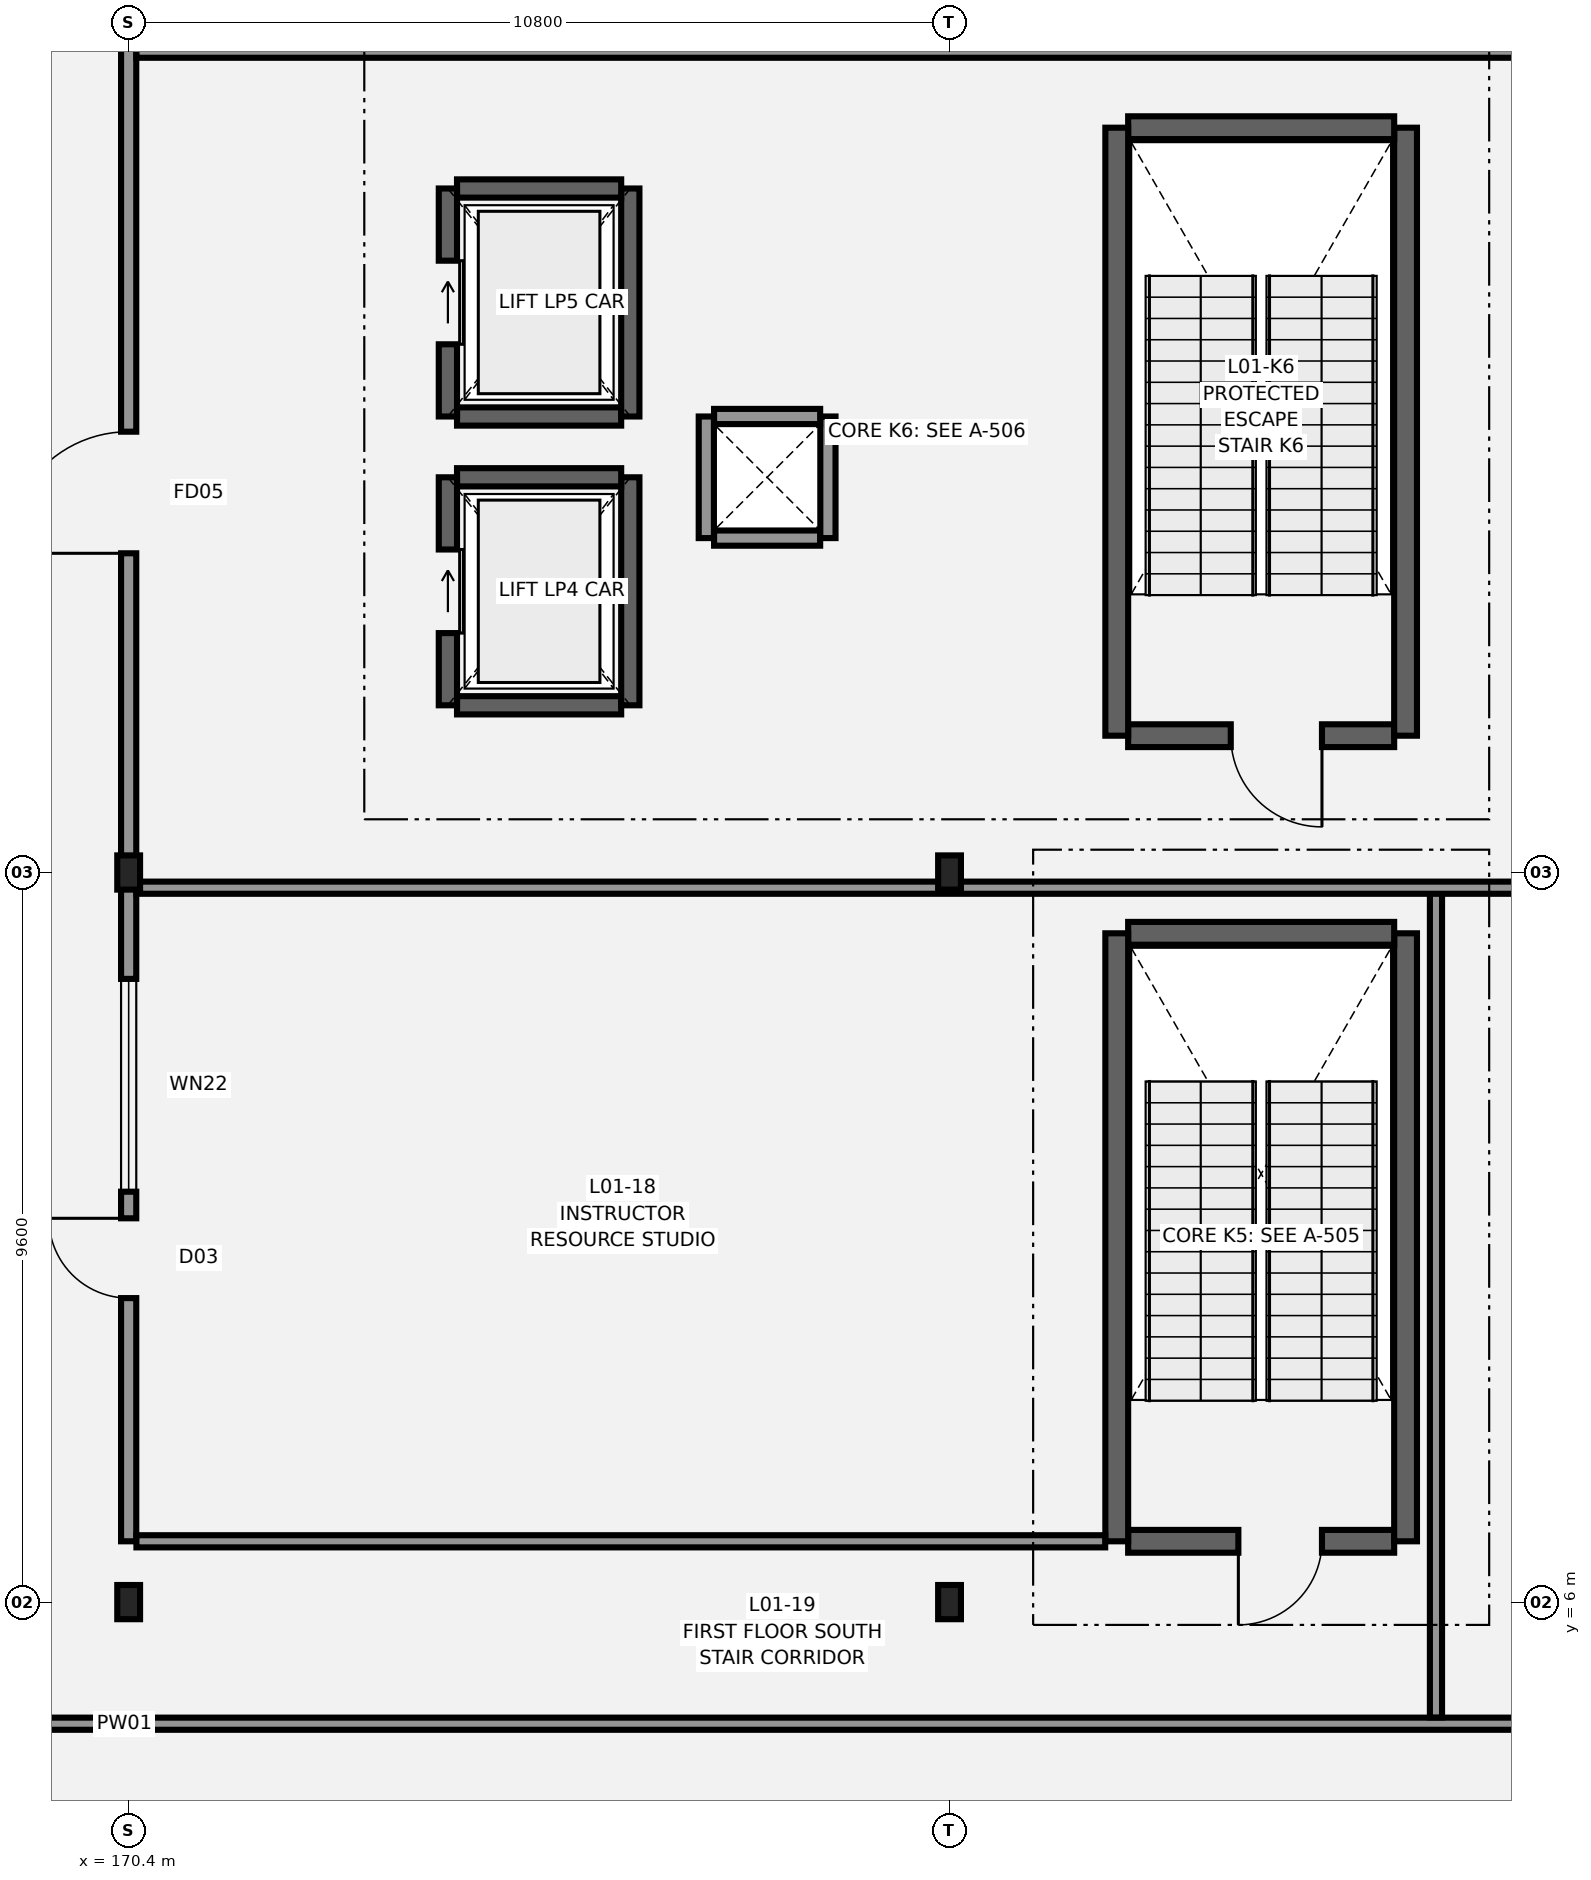
"""IFC4 building model, lengths in metres.
Left out: names, types, materials, properties, quantities, classifications, styles, units other than length and angle.
Written with IfcOpenShell. Run it as: python <this file> out.ifc"""

import sys

from ifc_helpers import new_model, si_unit, direction, frame, frame_2d, origin, origin_2d, place, context, subcontext, project, spatial, rectangle, i_section, extrude, element, fill, save


model = new_model("IFC4")
c1 = context("Model", 3, precision=1e-05, world=origin(), true_north=direction((0.0, 1.0)))
c2 = subcontext(c1, "Body", "Model", "MODEL_VIEW")
j1 = project(units=[si_unit("LENGTHUNIT", "METRE"), si_unit("PLANEANGLEUNIT", "RADIAN")], contexts=[c1])
p1 = place(None, origin())
s1 = spatial("IfcSite", under=j1, at=p1, CompositionType="ELEMENT")
p2 = place(p1, origin())
s2 = spatial("IfcBuilding", under=s1, at=p2, CompositionType="ELEMENT")
p3 = place(p2, frame((0.0, 0.0, 5.4)))
s3 = spatial("IfcBuildingStorey", under=s2, at=p3, CompositionType="ELEMENT", Elevation=5.4)
for number, where, z_axis, x_axis in (
    (1, (170.4, 6.0, 0.0), (0.0, 0.0, 1.0), (1.0, 0.0, 0.0)),
    (2, (170.4, 15.6, 0.0), (0.0, 0.0, 1.0), (1.0, 0.0, 0.0)),
    (3, (181.2, 6.0, 0.0), (0.0, 0.0, 1.0), (1.0, 0.0, 0.0)),
    (4, (181.2, 15.6, 0.0), (0.0, 0.0, 1.0), (1.0, 0.0, 0.0)),
):
    element("IfcColumn", number, at=place(p3, frame(where, z_axis=z_axis, x_axis=x_axis)), inside=s3, PredefinedType="COLUMN", context=c2, shape_type="SweptSolid", body=[
        extrude(i_section(OverallWidth=0.3, OverallDepth=0.45, WebThickness=0.014, FlangeThickness=0.026, FilletRadius=0.027, at=origin_2d()), origin(), (0.0, 0.0, 1.0), 4.8),
    ])
p4 = place(p3, frame((187.05, 6.8, 0.0), z_axis=(0.0, 0.0, 1.0), x_axis=(-1.0, 0.0, 0.0)))
e5 = element("IfcWall", 5, at=p4, inside=s3, PredefinedType="SHEAR", context=c2, shape_type="SweptSolid", body=[
    extrude(rectangle(XDim=3.5, YDim=0.3, at=frame_2d((1.75, 0.0))), origin(), (0.0, 0.0, 1.0), 4.49),
])
p5 = place(p4, frame((0.95, 0.0, 0.0)))
e6 = element("IfcOpeningElement", 6, at=p5, cuts=e5, PredefinedType="OPENING", context=c2, shape_type="SweptSolid", body=[
    extrude(rectangle(XDim=1.1, YDim=2.15, at=frame_2d((0.55, 1.075))), frame((0.0, 0.16, 0.0), z_axis=(0.0, -1.0, 0.0), x_axis=(1.0, 0.0, 0.0)), (0.0, 0.0, 1.0), 0.32),
])
p6 = place(p3, frame((187.2, 6.8, 0.0), z_axis=(0.0, 0.0, 1.0), x_axis=(0.0, 1.0, 0.0)))
e7 = element("IfcWall", 7, at=p6, inside=s3, PredefinedType="SHEAR", context=c2, shape_type="SweptSolid", body=[
    extrude(rectangle(XDim=8.0, YDim=0.3, at=frame_2d((4.0, 0.0))), origin(), (0.0, 0.0, 1.0), 4.49),
])
p7 = place(p3, frame((187.05, 14.8, 0.0), z_axis=(0.0, 0.0, 1.0), x_axis=(-1.0, 0.0, 0.0)))
e8 = element("IfcWall", 8, at=p7, inside=s3, PredefinedType="SHEAR", context=c2, shape_type="SweptSolid", body=[
    extrude(rectangle(XDim=3.5, YDim=0.3, at=frame_2d((1.75, 0.0))), origin(), (0.0, 0.0, 1.0), 4.49),
])
p8 = place(p3, frame((183.4, 14.8, 0.0), z_axis=(0.0, 0.0, 1.0), x_axis=(0.0, -1.0, 0.0)))
e9 = element("IfcWall", 9, at=p8, inside=s3, PredefinedType="SHEAR", context=c2, shape_type="SweptSolid", body=[
    extrude(rectangle(XDim=8.0, YDim=0.3, at=frame_2d((4.0, 0.0))), origin(), (0.0, 0.0, 1.0), 4.49),
])
p9 = place(p3, frame((187.05, 17.4, 0.0), z_axis=(0.0, 0.0, 1.0), x_axis=(-1.0, 0.0, 0.0)))
e10 = element("IfcWall", 10, at=p9, inside=s3, PredefinedType="SHEAR", context=c2, shape_type="SweptSolid", body=[
    extrude(rectangle(XDim=3.5, YDim=0.3, at=frame_2d((1.75, 0.0))), origin(), (0.0, 0.0, 1.0), 4.49),
])
p10 = place(p9, frame((0.95, 0.0, 0.0)))
e11 = element("IfcOpeningElement", 11, at=p10, cuts=e10, PredefinedType="OPENING", context=c2, shape_type="SweptSolid", body=[
    extrude(rectangle(XDim=1.2, YDim=2.2, at=frame_2d((0.6, 1.1))), frame((0.0, 0.16, 0.0), z_axis=(0.0, -1.0, 0.0), x_axis=(1.0, 0.0, 0.0)), (0.0, 0.0, 1.0), 0.32),
])
p11 = place(p3, frame((187.2, 17.4, 0.0), z_axis=(0.0, 0.0, 1.0), x_axis=(0.0, 1.0, 0.0)))
e12 = element("IfcWall", 12, at=p11, inside=s3, PredefinedType="SHEAR", context=c2, shape_type="SweptSolid", body=[
    extrude(rectangle(XDim=8.0, YDim=0.3, at=frame_2d((4.0, 0.0))), origin(), (0.0, 0.0, 1.0), 4.49),
])
p12 = place(p3, frame((187.05, 25.4, 0.0), z_axis=(0.0, 0.0, 1.0), x_axis=(-1.0, 0.0, 0.0)))
e13 = element("IfcWall", 13, at=p12, inside=s3, PredefinedType="SHEAR", context=c2, shape_type="SweptSolid", body=[
    extrude(rectangle(XDim=3.5, YDim=0.3, at=frame_2d((1.75, 0.0))), origin(), (0.0, 0.0, 1.0), 4.49),
])
p13 = place(p3, frame((183.4, 25.4, 0.0), z_axis=(0.0, 0.0, 1.0), x_axis=(0.0, -1.0, 0.0)))
e14 = element("IfcWall", 14, at=p13, inside=s3, PredefinedType="SHEAR", context=c2, shape_type="SweptSolid", body=[
    extrude(rectangle(XDim=8.0, YDim=0.3, at=frame_2d((4.0, 0.0))), origin(), (0.0, 0.0, 1.0), 4.49),
])
p14 = place(p3, frame((174.72, 17.8, 0.0), z_axis=(0.0, 0.0, 1.0), x_axis=(1.0, 0.0, 0.0)))
e15 = element("IfcWall", 15, at=p14, inside=s3, PredefinedType="SHEAR", context=c2, shape_type="SweptSolid", body=[
    extrude(rectangle(XDim=2.16, YDim=0.24, at=frame_2d((1.08, 0.0))), origin(), (0.0, 0.0, 1.0), 4.49),
])
p15 = place(p3, frame((177.0, 17.8, 0.0), z_axis=(0.0, 0.0, 1.0), x_axis=(0.0, 1.0, 0.0)))
e16 = element("IfcWall", 16, at=p15, inside=s3, PredefinedType="SHEAR", context=c2, shape_type="SweptSolid", body=[
    extrude(rectangle(XDim=3.0, YDim=0.24, at=frame_2d((1.5, 0.0))), origin(), (0.0, 0.0, 1.0), 4.49),
])
p16 = place(p3, frame((176.88, 20.8, 0.0), z_axis=(0.0, 0.0, 1.0), x_axis=(-1.0, 0.0, 0.0)))
e17 = element("IfcWall", 17, at=p16, inside=s3, PredefinedType="SHEAR", context=c2, shape_type="SweptSolid", body=[
    extrude(rectangle(XDim=2.16, YDim=0.24, at=frame_2d((1.08, 0.0))), origin(), (0.0, 0.0, 1.0), 4.49),
])
p17 = place(p3, frame((174.6, 20.8, 0.0), z_axis=(0.0, 0.0, 1.0), x_axis=(0.0, -1.0, 0.0)))
e18 = element("IfcWall", 18, at=p17, inside=s3, PredefinedType="SHEAR", context=c2, shape_type="SweptSolid", body=[
    extrude(rectangle(XDim=3.0, YDim=0.24, at=frame_2d((1.5, 0.0))), origin(), (0.0, 0.0, 1.0), 4.49),
])
p18 = place(p17, frame((0.95, 0.0, 0.0)))
e19 = element("IfcOpeningElement", 19, at=p18, cuts=e18, PredefinedType="OPENING", context=c2, shape_type="SweptSolid", body=[
    extrude(rectangle(XDim=1.1, YDim=2.1, at=frame_2d((0.55, 1.05))), frame((0.0, 0.13, 0.0), z_axis=(0.0, -1.0, 0.0), x_axis=(1.0, 0.0, 0.0)), (0.0, 0.0, 1.0), 0.26),
])
p19 = place(p3, frame((174.72, 21.6, 0.0), z_axis=(0.0, 0.0, 1.0), x_axis=(1.0, 0.0, 0.0)))
e20 = element("IfcWall", 20, at=p19, inside=s3, PredefinedType="SHEAR", context=c2, shape_type="SweptSolid", body=[
    extrude(rectangle(XDim=2.16, YDim=0.24, at=frame_2d((1.08, 0.0))), origin(), (0.0, 0.0, 1.0), 4.49),
])
p20 = place(p3, frame((177.0, 21.6, 0.0), z_axis=(0.0, 0.0, 1.0), x_axis=(0.0, 1.0, 0.0)))
e21 = element("IfcWall", 21, at=p20, inside=s3, PredefinedType="SHEAR", context=c2, shape_type="SweptSolid", body=[
    extrude(rectangle(XDim=3.0, YDim=0.24, at=frame_2d((1.5, 0.0))), origin(), (0.0, 0.0, 1.0), 4.49),
])
p21 = place(p3, frame((176.88, 24.6, 0.0), z_axis=(0.0, 0.0, 1.0), x_axis=(-1.0, 0.0, 0.0)))
e22 = element("IfcWall", 22, at=p21, inside=s3, PredefinedType="SHEAR", context=c2, shape_type="SweptSolid", body=[
    extrude(rectangle(XDim=2.16, YDim=0.24, at=frame_2d((1.08, 0.0))), origin(), (0.0, 0.0, 1.0), 4.49),
])
p22 = place(p3, frame((174.6, 24.6, 0.0), z_axis=(0.0, 0.0, 1.0), x_axis=(0.0, -1.0, 0.0)))
e23 = element("IfcWall", 23, at=p22, inside=s3, PredefinedType="SHEAR", context=c2, shape_type="SweptSolid", body=[
    extrude(rectangle(XDim=3.0, YDim=0.24, at=frame_2d((1.5, 0.0))), origin(), (0.0, 0.0, 1.0), 4.49),
])
p23 = place(p22, frame((0.95, 0.0, 0.0)))
e24 = element("IfcOpeningElement", 24, at=p23, cuts=e23, PredefinedType="OPENING", context=c2, shape_type="SweptSolid", body=[
    extrude(rectangle(XDim=1.1, YDim=2.1, at=frame_2d((0.55, 1.05))), frame((0.0, 0.13, 0.0), z_axis=(0.0, -1.0, 0.0), x_axis=(1.0, 0.0, 0.0)), (0.0, 0.0, 1.0), 0.26),
])
p24 = place(p3, frame((148.882, 4.4, 0.0), z_axis=(0.0, 0.0, 1.0), x_axis=(1.0, 0.0, 0.0)))
e25 = element("IfcWall", 25, at=p24, inside=s3, PredefinedType="PARTITIONING", context=c2, shape_type="SweptSolid", body=[
    extrude(rectangle(XDim=42.926, YDim=0.16, at=frame_2d((21.463, 0.0))), origin(), (0.0, 0.0, 1.0), 4.44),
])
p25 = place(p24, frame((19.0, 0.0, 0.0)))
e26 = element("IfcOpeningElement", 26, at=p25, cuts=e25, PredefinedType="OPENING", context=c2, shape_type="SweptSolid", body=[
    extrude(rectangle(XDim=1.15, YDim=2.15, at=frame_2d((0.575, 1.075))), frame((0.0, 0.09, 0.0), z_axis=(0.0, -1.0, 0.0), x_axis=(1.0, 0.0, 0.0)), (0.0, 0.0, 1.0), 0.18),
])
p26 = place(p3, frame((170.4, 6.8, 0.0), z_axis=(0.0, 0.0, 1.0), x_axis=(0.0, 1.0, 0.0)))
e27 = element("IfcWall", 27, at=p26, inside=s3, PredefinedType="PARTITIONING", context=c2, shape_type="SweptSolid", body=[
    extrude(rectangle(XDim=56.628, YDim=0.2, at=frame_2d((28.314, 0.0))), origin(), (0.0, 0.0, 1.0), 4.135),
])
p27 = place(p26, frame((3.2, 0.0, 0.0)))
e28 = element("IfcOpeningElement", 28, at=p27, cuts=e27, PredefinedType="OPENING", context=c2, shape_type="SweptSolid", body=[
    extrude(rectangle(XDim=1.05, YDim=2.15, at=frame_2d((0.525, 1.075))), frame((0.0, 0.11, 0.0), z_axis=(0.0, -1.0, 0.0), x_axis=(1.0, 0.0, 0.0)), (0.0, 0.0, 1.0), 0.22),
])
p28 = place(p26, frame((13.0, 0.0, 0.0)))
e29 = element("IfcOpeningElement", 29, at=p28, cuts=e27, PredefinedType="OPENING", context=c2, shape_type="SweptSolid", body=[
    extrude(rectangle(XDim=1.6, YDim=2.2, at=frame_2d((0.8, 1.1))), frame((0.0, 0.11, 0.0), z_axis=(0.0, -1.0, 0.0), x_axis=(1.0, 0.0, 0.0)), (0.0, 0.0, 1.0), 0.22),
])
p29 = place(p26, frame((26.0, 0.0, 0.0)))
e30 = element("IfcOpeningElement", 30, at=p29, cuts=e27, PredefinedType="OPENING", context=c2, shape_type="SweptSolid", body=[
    extrude(rectangle(XDim=1.3, YDim=2.15, at=frame_2d((0.65, 1.075))), frame((0.0, 0.11, 0.0), z_axis=(0.0, -1.0, 0.0), x_axis=(1.0, 0.0, 0.0)), (0.0, 0.0, 1.0), 0.22),
])
p30 = place(p26, frame((47.6, 0.0, 0.0)))
e31 = element("IfcOpeningElement", 31, at=p30, cuts=e27, PredefinedType="OPENING", context=c2, shape_type="SweptSolid", body=[
    extrude(rectangle(XDim=1.3, YDim=2.15, at=frame_2d((0.65, 1.075))), frame((0.0, 0.11, 0.0), z_axis=(0.0, -1.0, 0.0), x_axis=(1.0, 0.0, 0.0)), (0.0, 0.0, 1.0), 0.22),
])
p31 = place(p26, frame((53.2, 0.0, 0.0)))
e32 = element("IfcOpeningElement", 32, at=p31, cuts=e27, PredefinedType="OPENING", context=c2, shape_type="SweptSolid", body=[
    extrude(rectangle(XDim=1.02, YDim=2.12, at=frame_2d((0.51, 1.06))), frame((0.0, 0.11, 0.0), z_axis=(0.0, -1.0, 0.0), x_axis=(1.0, 0.0, 0.0)), (0.0, 0.0, 1.0), 0.22),
])
p32 = place(p26, frame((4.6, 0.0, 1.05)))
e33 = element("IfcOpeningElement", 33, at=p32, cuts=e27, PredefinedType="OPENING", context=c2, shape_type="SweptSolid", body=[
    extrude(rectangle(XDim=2.8, YDim=1.3, at=frame_2d((1.4, 0.65))), frame((0.0, 0.11, 0.0), z_axis=(0.0, -1.0, 0.0), x_axis=(1.0, 0.0, 0.0)), (0.0, 0.0, 1.0), 0.22),
])
p33 = place(p3, frame((170.502, 6.8, 0.0), z_axis=(0.0, 0.0, 1.0), x_axis=(1.0, 0.0, 0.0)))
e34 = element("IfcWall", 34, at=p33, inside=s3, PredefinedType="PARTITIONING", context=c2, shape_type="SweptSolid", body=[
    extrude(rectangle(XDim=12.746, YDim=0.16, at=frame_2d((6.373, 0.0))), origin(), (0.0, 0.0, 1.0), 4.44),
])
p34 = place(p3, frame((187.6, 4.482, 0.0), z_axis=(0.0, 0.0, 1.0), x_axis=(0.0, 1.0, 0.0)))
e35 = element("IfcWall", 35, at=p34, inside=s3, PredefinedType="PARTITIONING", context=c2, shape_type="SweptSolid", body=[
    extrude(rectangle(XDim=10.918, YDim=0.16, at=frame_2d((5.459, 0.0))), origin(), (0.0, 0.0, 1.0), 4.44),
])
p35 = place(p3, frame((170.502, 15.4, 0.0), z_axis=(0.0, 0.0, 1.0), x_axis=(1.0, 0.0, 0.0)))
e36 = element("IfcWall", 36, at=p35, inside=s3, PredefinedType="PARTITIONING", context=c2, shape_type="SweptSolid", body=[
    extrude(rectangle(XDim=21.198, YDim=0.16, at=frame_2d((10.599, 0.0))), origin(), (0.0, 0.0, 1.0), 4.045),
])
p36 = place(p3, frame((170.502, 26.4, 0.0), z_axis=(0.0, 0.0, 1.0), x_axis=(1.0, 0.0, 0.0)))
e37 = element("IfcWall", 37, at=p36, inside=s3, PredefinedType="PARTITIONING", context=c2, shape_type="SweptSolid", body=[
    extrude(rectangle(XDim=21.306, YDim=0.16, at=frame_2d((10.653, 0.0))), origin(), (0.0, 0.0, 1.0), 4.44),
])
p37 = place(p3, frame((178.102, 20.0, 0.0), z_axis=(0.0, 0.0, 1.0), x_axis=(1.0, 0.0, 0.0)))
e38 = element("IfcWall", 38, at=p37, inside=s3, PredefinedType="PARTITIONING", context=c2, shape_type="SweptSolid", body=[
    extrude(rectangle(XDim=1.396, YDim=0.2, at=frame_2d((0.698, 0.0))), origin(), (0.0, 0.0, 1.0), 4.44),
])
p38 = place(p3, frame((179.6, 20.0, 0.0), z_axis=(0.0, 0.0, 1.0), x_axis=(0.0, 1.0, 0.0)))
e39 = element("IfcWall", 39, at=p38, inside=s3, PredefinedType="PARTITIONING", context=c2, shape_type="SweptSolid", body=[
    extrude(rectangle(XDim=1.6, YDim=0.2, at=frame_2d((0.8, 0.0))), origin(), (0.0, 0.0, 1.0), 4.44),
])
p39 = place(p3, frame((179.498, 21.6, 0.0), z_axis=(0.0, 0.0, 1.0), x_axis=(-1.0, 0.0, 0.0)))
e40 = element("IfcWall", 40, at=p39, inside=s3, PredefinedType="PARTITIONING", context=c2, shape_type="SweptSolid", body=[
    extrude(rectangle(XDim=1.396, YDim=0.2, at=frame_2d((0.698, 0.0))), origin(), (0.0, 0.0, 1.0), 4.44),
])
p40 = place(p3, frame((178.0, 21.6, 0.0), z_axis=(0.0, 0.0, 1.0), x_axis=(0.0, -1.0, 0.0)))
e41 = element("IfcWall", 41, at=p40, inside=s3, PredefinedType="PARTITIONING", context=c2, shape_type="SweptSolid", body=[
    extrude(rectangle(XDim=1.6, YDim=0.2, at=frame_2d((0.8, 0.0))), origin(), (0.0, 0.0, 1.0), 4.44),
])
p41 = place(p27, origin())
e42 = element("IfcDoor", 42, at=p41, inside=s3, OperationType="SINGLE_SWING_RIGHT", PredefinedType="DOOR", context=c2, shape_type="SweptSolid", body=[
    extrude(rectangle(XDim=1.05, YDim=2.15, at=frame_2d((0.525, 1.075))), frame((0.0, 0.025, 0.0), z_axis=(0.0, -1.0, 0.0), x_axis=(1.0, 0.0, 0.0)), (0.0, 0.0, 1.0), 0.05),
])
fill(e28, e42)
p42 = place(p28, origin())
e43 = element("IfcDoor", 43, at=p42, inside=s3, OperationType="SINGLE_SWING_LEFT", PredefinedType="DOOR", context=c2, shape_type="SweptSolid", body=[
    extrude(rectangle(XDim=1.6, YDim=2.2, at=frame_2d((0.8, 1.1))), frame((0.0, 0.025, 0.0), z_axis=(0.0, -1.0, 0.0), x_axis=(1.0, 0.0, 0.0)), (0.0, 0.0, 1.0), 0.05),
])
fill(e29, e43)
p43 = place(p32, origin())
e44 = element("IfcWindow", 44, at=p43, inside=s3, PartitioningType="SINGLE_PANEL", PredefinedType="WINDOW", context=c2, shape_type="SweptSolid", body=[
    extrude(rectangle(XDim=2.8, YDim=1.3, at=frame_2d((1.4, 0.65))), frame((0.0, 0.03, 0.0), z_axis=(0.0, -1.0, 0.0), x_axis=(1.0, 0.0, 0.0)), (0.0, 0.0, 1.0), 0.06),
])
fill(e33, e44)
p44 = place(p5, origin())
e45 = element("IfcDoor", 45, at=p44, inside=s3, OperationType="SINGLE_SWING_RIGHT", PredefinedType="DOOR", context=c2, shape_type="SweptSolid", body=[
    extrude(rectangle(XDim=1.1, YDim=2.15, at=frame_2d((0.55, 1.075))), frame((0.0, 0.025, 0.0), z_axis=(0.0, -1.0, 0.0), x_axis=(1.0, 0.0, 0.0)), (0.0, 0.0, 1.0), 0.05),
])
fill(e6, e45)
p45 = place(p10, origin())
e46 = element("IfcDoor", 46, at=p45, inside=s3, OperationType="SINGLE_SWING_LEFT", PredefinedType="DOOR", context=c2, shape_type="SweptSolid", body=[
    extrude(rectangle(XDim=1.2, YDim=2.2, at=frame_2d((0.6, 1.1))), frame((0.0, 0.025, 0.0), z_axis=(0.0, -1.0, 0.0), x_axis=(1.0, 0.0, 0.0)), (0.0, 0.0, 1.0), 0.05),
])
fill(e11, e46)
p46 = place(p18, origin())
e47 = element("IfcDoor", 47, at=p46, inside=s3, OperationType="SLIDING_TO_LEFT", PredefinedType="DOOR", context=c2, shape_type="SweptSolid", body=[
    extrude(rectangle(XDim=1.1, YDim=2.1, at=frame_2d((0.55, 1.05))), frame((0.0, 0.025, 0.0), z_axis=(0.0, -1.0, 0.0), x_axis=(1.0, 0.0, 0.0)), (0.0, 0.0, 1.0), 0.05),
])
fill(e19, e47)
p47 = place(p23, origin())
e48 = element("IfcDoor", 48, at=p47, inside=s3, OperationType="SLIDING_TO_LEFT", PredefinedType="DOOR", context=c2, shape_type="SweptSolid", body=[
    extrude(rectangle(XDim=1.1, YDim=2.1, at=frame_2d((0.55, 1.05))), frame((0.0, 0.025, 0.0), z_axis=(0.0, -1.0, 0.0), x_axis=(1.0, 0.0, 0.0)), (0.0, 0.0, 1.0), 0.05),
])
fill(e24, e48)
save(model, sys.argv[1])
